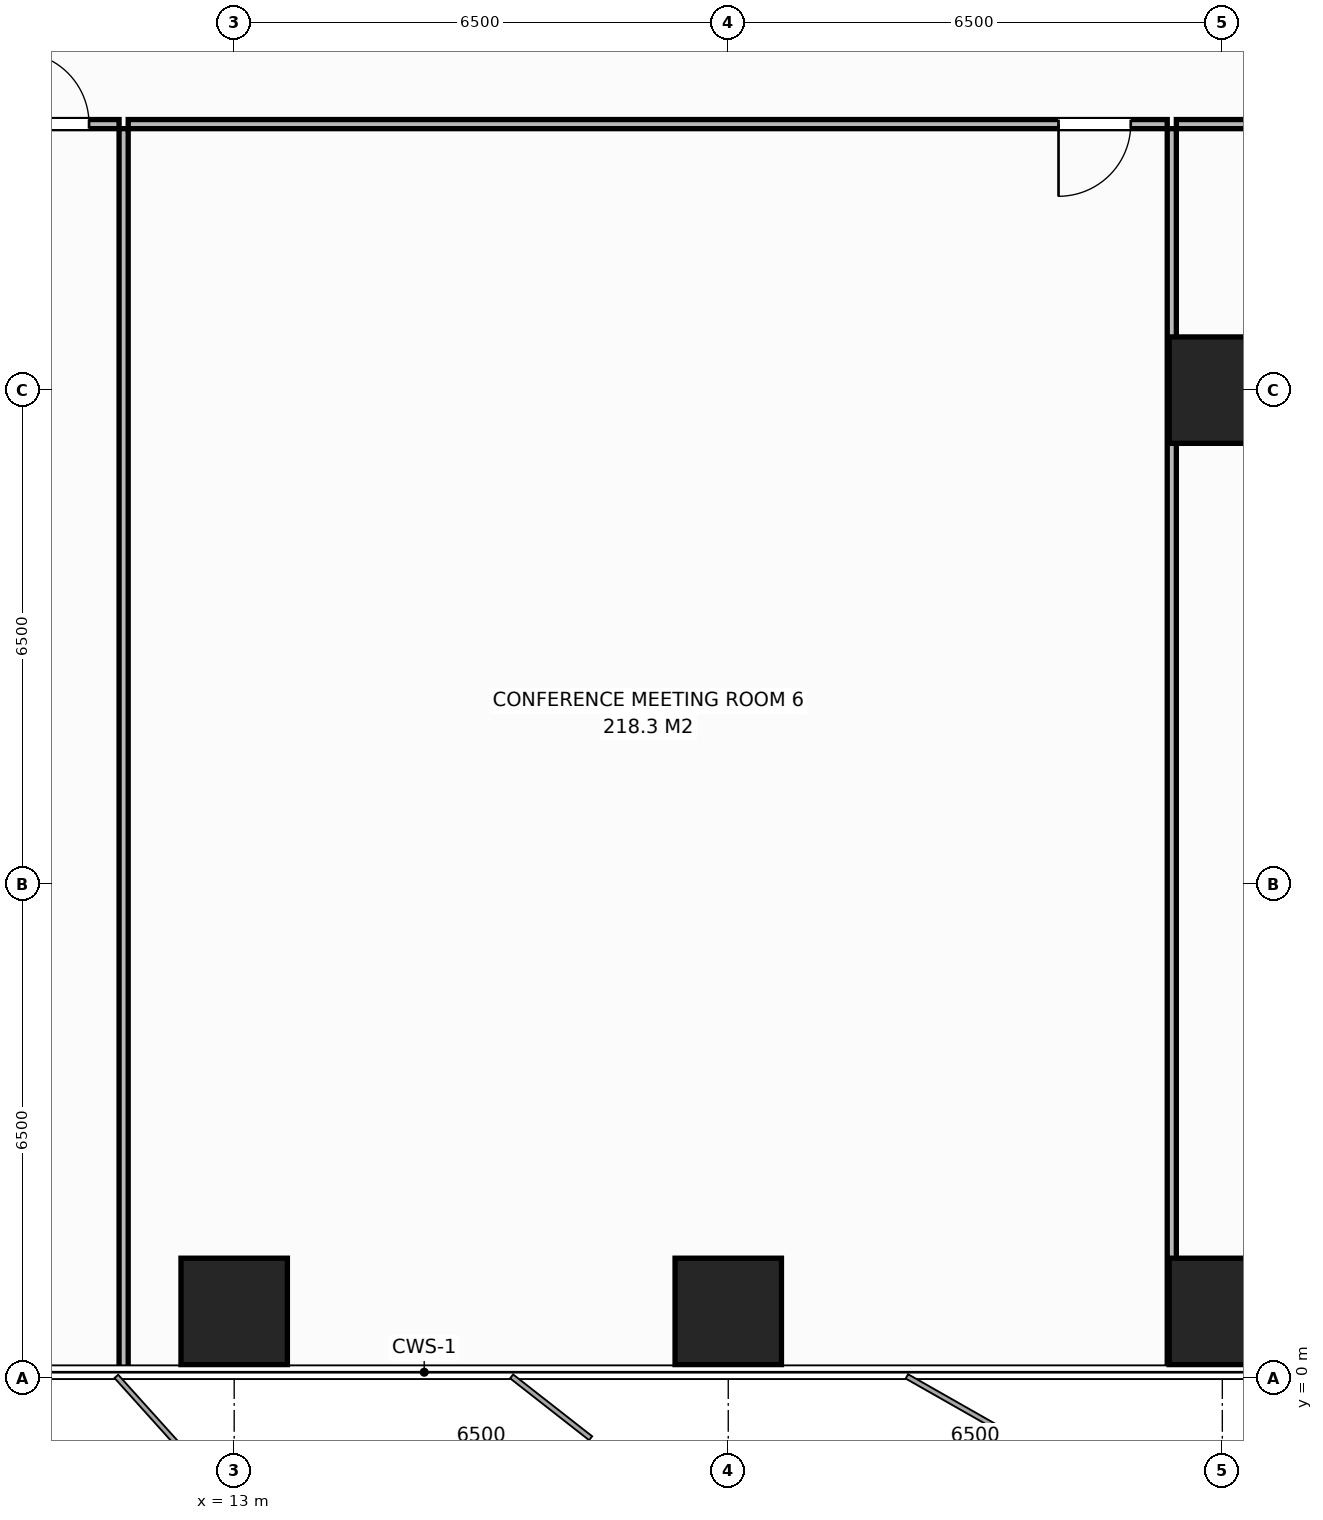
"""IFC4 building model, lengths in metres.
Left out: names, types, materials, properties, quantities, classifications, styles, units other than length and angle.
Written with IfcOpenShell. Run it as: python <this file> out.ifc"""

import sys

from ifc_helpers import new_model, si_unit, direction, frame, frame_2d, origin, origin_2d, place, context, subcontext, project, spatial, rectangle, extrude, element, fill, save


model = new_model("IFC4")
c1 = context("Model", 3, precision=1e-05, world=origin(), true_north=direction((0.0, 1.0)))
c2 = subcontext(c1, "Body", "Model", "MODEL_VIEW")
j1 = project(units=[si_unit("LENGTHUNIT", "METRE"), si_unit("PLANEANGLEUNIT", "RADIAN")], contexts=[c1])
p1 = place(None, origin())
s1 = spatial("IfcSite", under=j1, at=p1, CompositionType="ELEMENT")
p2 = place(p1, origin())
s2 = spatial("IfcBuilding", under=s1, at=p2, CompositionType="ELEMENT")
p3 = place(p2, frame((0.0, 0.0, 77.2)))
s3 = spatial("IfcBuildingStorey", under=s2, at=p3, CompositionType="ELEMENT", Elevation=77.2)
for number, where, z_axis, x_axis in (
    (1, (26.0, 13.0, 0.0), (0.0, 0.0, 1.0), (1.0, 0.0, 0.0)),
    (2, (13.0, 0.88, 0.0), (0.0, 0.0, 1.0), (1.0, 0.0, 0.0)),
    (3, (19.5, 0.88, 0.0), (0.0, 0.0, 1.0), (1.0, 0.0, 0.0)),
    (4, (26.0, 0.88, 0.0), (0.0, 0.0, 1.0), (1.0, 0.0, 0.0)),
):
    element("IfcColumn", number, at=place(p3, frame(where, z_axis=z_axis, x_axis=x_axis)), inside=s3, PredefinedType="COLUMN", context=c2, shape_type="SweptSolid", body=[
        extrude(rectangle(XDim=1.4, YDim=1.4, at=origin_2d()), origin(), (0.0, 0.0, 1.0), 3.8),
    ])
p4 = place(p3, frame((11.545, 0.02, 0.0), z_axis=(0.0, 0.0, 1.0), x_axis=(0.0, 1.0, 0.0)))
e5 = element("IfcWall", 5, at=p4, inside=s3, PredefinedType="PARTITIONING", context=c2, shape_type="SweptSolid", body=[
    extrude(rectangle(XDim=16.42, YDim=0.12, at=frame_2d((8.21, 0.0))), origin(), (0.0, 0.0, 1.0), 3.52),
])
p5 = place(p3, frame((-0.02, 16.5, 0.0), z_axis=(0.0, 0.0, 1.0), x_axis=(1.0, 0.0, 0.0)))
e6 = element("IfcWall", 6, at=p5, inside=s3, PredefinedType="PARTITIONING", context=c2, shape_type="SweptSolid", body=[
    extrude(rectangle(XDim=11.506, YDim=0.12, at=frame_2d((5.753, 0.0))), origin(), (0.0, 0.0, 1.0), 3.52),
])
p6 = place(p5, frame((10.16, 0.0, 0.0)))
e7 = element("IfcOpeningElement", 7, at=p6, cuts=e6, PredefinedType="OPENING", context=c2, shape_type="SweptSolid", body=[
    extrude(rectangle(XDim=0.95, YDim=2.15, at=frame_2d((0.475, 1.075))), frame((0.0, 0.07, 0.0), z_axis=(0.0, -1.0, 0.0), x_axis=(1.0, 0.0, 0.0)), (0.0, 0.0, 1.0), 0.14),
])
p7 = place(p3, frame((25.335, 0.02, 0.0), z_axis=(0.0, 0.0, 1.0), x_axis=(0.0, 1.0, 0.0)))
e8 = element("IfcWall", 8, at=p7, inside=s3, PredefinedType="PARTITIONING", context=c2, shape_type="SweptSolid", body=[
    extrude(rectangle(XDim=16.42, YDim=0.12, at=frame_2d((8.21, 0.0))), origin(), (0.0, 0.0, 1.0), 3.52),
])
p8 = place(p3, frame((11.605, 16.5, 0.0), z_axis=(0.0, 0.0, 1.0), x_axis=(1.0, 0.0, 0.0)))
e9 = element("IfcWall", 9, at=p8, inside=s3, PredefinedType="PARTITIONING", context=c2, shape_type="SweptSolid", body=[
    extrude(rectangle(XDim=13.67, YDim=0.12, at=frame_2d((6.835, 0.0))), origin(), (0.0, 0.0, 1.0), 3.52),
])
p9 = place(p8, frame((12.24, 0.0, 0.0)))
e10 = element("IfcOpeningElement", 10, at=p9, cuts=e9, PredefinedType="OPENING", context=c2, shape_type="SweptSolid", body=[
    extrude(rectangle(XDim=0.95, YDim=2.15, at=frame_2d((0.475, 1.075))), frame((0.0, 0.07, 0.0), z_axis=(0.0, -1.0, 0.0), x_axis=(1.0, 0.0, 0.0)), (0.0, 0.0, 1.0), 0.14),
])
p10 = place(p3, frame((25.395, 16.5, 0.0), z_axis=(0.0, 0.0, 1.0), x_axis=(1.0, 0.0, 0.0)))
e11 = element("IfcWall", 11, at=p10, inside=s3, PredefinedType="PARTITIONING", context=c2, shape_type="SweptSolid", body=[
    extrude(rectangle(XDim=10.415, YDim=0.12, at=frame_2d((5.208, 0.0))), origin(), (0.0, 0.0, 1.0), 3.52),
])
p11 = place(p10, frame((8.985, 0.0, 0.0)))
e12 = element("IfcOpeningElement", 12, at=p11, cuts=e11, PredefinedType="OPENING", context=c2, shape_type="SweptSolid", body=[
    extrude(rectangle(XDim=0.95, YDim=2.15, at=frame_2d((0.475, 1.075))), frame((0.0, 0.07, 0.0), z_axis=(0.0, -1.0, 0.0), x_axis=(1.0, 0.0, 0.0)), (0.0, 0.0, 1.0), 0.14),
])
p12 = place(p6, origin())
e13 = element("IfcDoor", 13, at=p12, inside=s3, OperationType="SINGLE_SWING_LEFT", PredefinedType="DOOR", context=c2, shape_type="SweptSolid", body=[
    extrude(rectangle(XDim=0.95, YDim=2.15, at=frame_2d((0.475, 1.075))), frame((0.0, 0.025, 0.0), z_axis=(0.0, -1.0, 0.0), x_axis=(1.0, 0.0, 0.0)), (0.0, 0.0, 1.0), 0.05),
])
fill(e7, e13)
p13 = place(p9, origin())
e14 = element("IfcDoor", 14, at=p13, inside=s3, OperationType="SINGLE_SWING_RIGHT", PredefinedType="DOOR", context=c2, shape_type="SweptSolid", body=[
    extrude(rectangle(XDim=0.95, YDim=2.15, at=frame_2d((0.475, 1.075))), frame((0.0, 0.025, 0.0), z_axis=(0.0, -1.0, 0.0), x_axis=(1.0, 0.0, 0.0)), (0.0, 0.0, 1.0), 0.05),
])
fill(e10, e14)
save(model, sys.argv[1])
